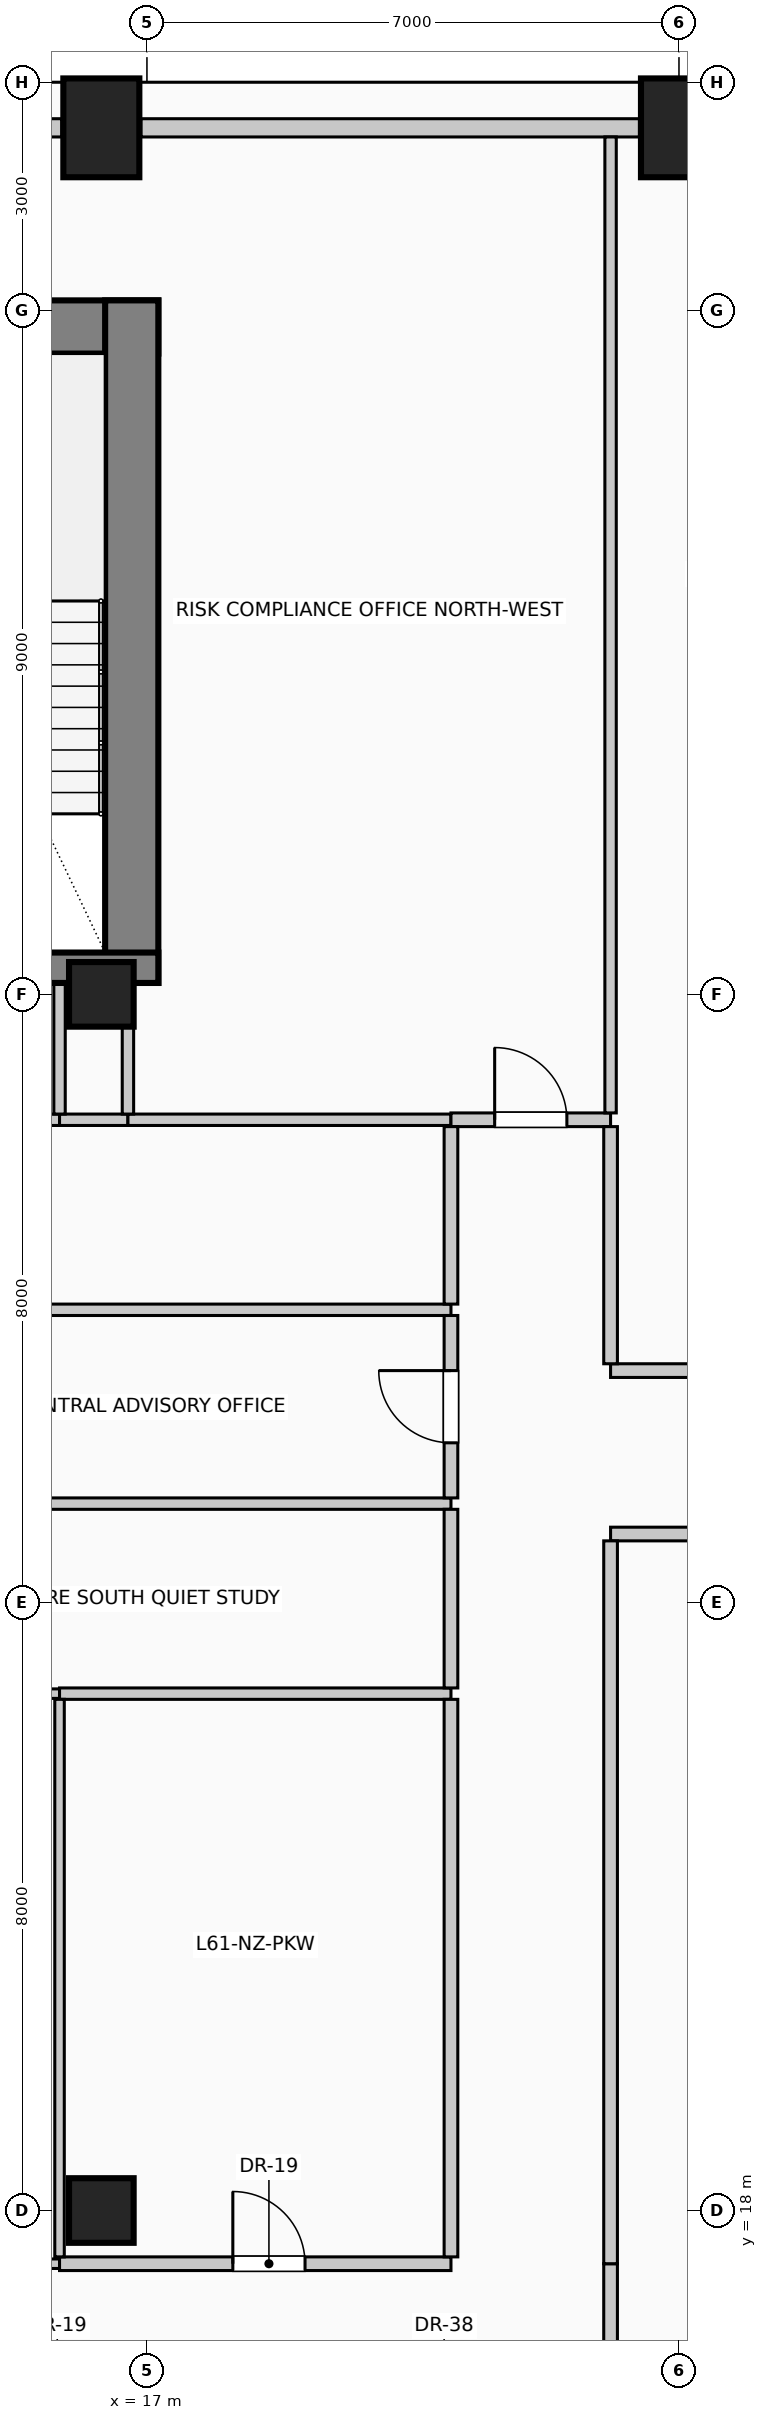
"""IFC4 building model, lengths in metres.
Left out: names, types, materials, properties, quantities, classifications, styles, units other than length and angle.
Written with IfcOpenShell. Run it as: python <this file> out.ifc"""

import sys

from ifc_helpers import new_model, si_unit, direction, frame, frame_2d, origin, origin_2d, place, context, subcontext, project, spatial, rectangle, circle, extrude, element, fill, save


model = new_model("IFC4")
c1 = context("Model", 3, precision=1e-05, world=origin(), true_north=direction((0.0, 1.0)))
c2 = subcontext(c1, "Body", "Model", "MODEL_VIEW")
j1 = project(units=[si_unit("LENGTHUNIT", "METRE"), si_unit("PLANEANGLEUNIT", "RADIAN")], contexts=[c1])
p1 = place(None, origin())
s1 = spatial("IfcSite", under=j1, at=p1, CompositionType="ELEMENT")
p2 = place(p1, origin())
s2 = spatial("IfcBuilding", under=s1, at=p2, CompositionType="ELEMENT")
p3 = place(p2, frame((0.0, 0.0, 252.6)))
s3 = spatial("IfcBuildingStorey", under=s2, at=p3, CompositionType="ELEMENT", Elevation=252.6)
p4 = place(p3, frame((2.85, 42.78, 0.0), z_axis=(0.0, 0.0, 1.0), x_axis=(1.0, 0.0, 0.0)))
e1 = element("IfcWall", 1, at=p4, inside=s3, PredefinedType="SHEAR", context=c2, shape_type="SweptSolid", body=[
    extrude(rectangle(XDim=14.3, YDim=0.7, at=frame_2d((7.15, 0.0))), origin(), (0.0, 0.0, 1.0), 4.0),
])
p5 = place(p3, frame((16.8, 34.15, 0.0), z_axis=(0.0, 0.0, 1.0), x_axis=(0.0, 1.0, 0.0)))
e2 = element("IfcWall", 2, at=p5, inside=s3, PredefinedType="SHEAR", context=c2, shape_type="SweptSolid", body=[
    extrude(rectangle(XDim=8.98, YDim=0.7, at=frame_2d((4.49, 0.0))), origin(), (0.0, 0.0, 1.0), 4.0),
])
p6 = place(p3, frame((12.29, 34.35, 0.0), z_axis=(0.0, 0.0, 1.0), x_axis=(1.0, 0.0, 0.0)))
e3 = element("IfcWall", 3, at=p6, inside=s3, PredefinedType="SHEAR", context=c2, shape_type="SweptSolid", body=[
    extrude(rectangle(XDim=4.86, YDim=0.4, at=frame_2d((2.43, 0.0))), origin(), (0.0, 0.0, 1.0), 4.0),
])
p7 = place(p6, frame((1.4, 0.0, 0.0)))
e4 = element("IfcOpeningElement", 4, at=p7, cuts=e3, PredefinedType="OPENING", context=c2, shape_type="SweptSolid", body=[
    extrude(rectangle(XDim=1.15, YDim=2.2, at=frame_2d((0.575, 1.1))), frame((0.0, 0.21, 0.0), z_axis=(0.0, -1.0, 0.0), x_axis=(1.0, 0.0, 0.0)), (0.0, 0.0, 1.0), 0.42),
])
for number, where, z_axis, x_axis in (
    (5, (16.4, 45.4, 0.0), (0.0, 0.0, 1.0), (1.0, 0.0, 0.0)),
    (6, (24.0, 45.4, 0.0), (0.0, 0.0, 1.0), (1.0, 0.0, 0.0)),
):
    element("IfcColumn", number, at=place(p3, frame(where, z_axis=z_axis, x_axis=x_axis)), inside=s3, PredefinedType="COLUMN", context=c2, shape_type="SweptSolid", body=[
        extrude(rectangle(XDim=1.0, YDim=1.3, at=origin_2d()), origin(), (0.0, 0.0, 1.0), 4.0),
    ])
for number, where, z_axis, x_axis in (
    (7, (16.4, 18.0, 0.0), (0.0, 0.0, 1.0), (1.0, 0.0, 0.0)),
    (8, (16.4, 34.0, 0.0), (0.0, 0.0, 1.0), (1.0, 0.0, 0.0)),
):
    element("IfcColumn", number, at=place(p3, frame(where, z_axis=z_axis, x_axis=x_axis)), inside=s3, PredefinedType="COLUMN", context=c2, shape_type="SweptSolid", body=[
        extrude(circle(Radius=0.425, at=origin_2d()), origin(), (0.0, 0.0, 1.0), 4.0),
    ])
p8 = place(p3, frame((14.395, 45.4, 0.0), z_axis=(0.0, 0.0, 1.0), x_axis=(1.0, 0.0, 0.0)))
e9 = element("IfcWall", 9, at=p8, inside=s3, PredefinedType="SOLIDWALL", context=c2, shape_type="SweptSolid", body=[
    extrude(rectangle(XDim=1.485, YDim=0.24, at=frame_2d((0.742, 0.0))), origin(), (0.0, 0.0, 1.0), 3.0),
])
p9 = place(p3, frame((16.92, 45.4, 0.0), z_axis=(0.0, 0.0, 1.0), x_axis=(1.0, 0.0, 0.0)))
e10 = element("IfcWall", 10, at=p9, inside=s3, PredefinedType="SOLIDWALL", context=c2, shape_type="SweptSolid", body=[
    extrude(rectangle(XDim=6.56, YDim=0.24, at=frame_2d((3.28, 0.0))), origin(), (0.0, 0.0, 1.0), 3.0),
])
p10 = place(p3, frame((9.8, 17.3, 0.0), z_axis=(0.0, 0.0, 1.0), x_axis=(1.0, 0.0, 0.0)))
e11 = element("IfcWall", 11, at=p10, inside=s3, PredefinedType="PARTITIONING", context=c2, shape_type="SweptSolid", body=[
    extrude(rectangle(XDim=6.05, YDim=0.125, at=frame_2d((3.025, 0.0))), origin(), (0.0, 0.0, 1.0), 3.75),
])
p11 = place(p10, frame((2.575, 0.0, 0.0)))
e12 = element("IfcOpeningElement", 12, at=p11, cuts=e11, PredefinedType="OPENING", context=c2, shape_type="SweptSolid", body=[
    extrude(rectangle(XDim=0.9, YDim=2.1, at=frame_2d((0.45, 1.05))), frame((0.0, 0.073, 0.0), z_axis=(0.0, -1.0, 0.0), x_axis=(1.0, 0.0, 0.0)), (0.0, 0.0, 1.0), 0.145),
])
p12 = place(p3, frame((15.85, 17.3, 0.0), z_axis=(0.0, 0.0, 1.0), x_axis=(1.0, 0.0, 0.0)))
e13 = element("IfcWall", 13, at=p12, inside=s3, PredefinedType="PARTITIONING", context=c2, shape_type="SweptSolid", body=[
    extrude(rectangle(XDim=5.15, YDim=0.18, at=frame_2d((2.575, 0.0))), origin(), (0.0, 0.0, 1.0), 3.75),
])
p13 = place(p12, frame((2.28, 0.0, 0.0)))
e14 = element("IfcOpeningElement", 14, at=p13, cuts=e13, PredefinedType="OPENING", context=c2, shape_type="SweptSolid", body=[
    extrude(rectangle(XDim=0.95, YDim=2.15, at=frame_2d((0.475, 1.075))), frame((0.0, 0.1, 0.0), z_axis=(0.0, -1.0, 0.0), x_axis=(1.0, 0.0, 0.0)), (0.0, 0.0, 1.0), 0.2),
])
p14 = place(p3, frame((12.2, 24.8, 0.0), z_axis=(0.0, 0.0, 1.0), x_axis=(1.0, 0.0, 0.0)))
e15 = element("IfcWall", 15, at=p14, inside=s3, PredefinedType="PARTITIONING", context=c2, shape_type="SweptSolid", body=[
    extrude(rectangle(XDim=3.65, YDim=0.125, at=frame_2d((1.825, 0.0))), origin(), (0.0, 0.0, 1.0), 3.75),
])
p15 = place(p3, frame((15.85, 24.8, 0.0), z_axis=(0.0, 0.0, 1.0), x_axis=(1.0, 0.0, 0.0)))
e16 = element("IfcWall", 16, at=p15, inside=s3, PredefinedType="PARTITIONING", context=c2, shape_type="SweptSolid", body=[
    extrude(rectangle(XDim=5.15, YDim=0.15, at=frame_2d((2.575, 0.0))), origin(), (0.0, 0.0, 1.0), 3.75),
])
p16 = place(p3, frame((23.1, 26.9, 0.0), z_axis=(0.0, 0.0, 1.0), x_axis=(1.0, 0.0, 0.0)))
e17 = element("IfcWall", 17, at=p16, inside=s3, PredefinedType="PARTITIONING", context=c2, shape_type="SweptSolid", body=[
    extrude(rectangle(XDim=9.02, YDim=0.18, at=frame_2d((4.51, 0.0))), origin(), (0.0, 0.0, 1.0), 3.75),
])
p17 = place(p16, frame((4.035, 0.0, 0.0)))
e18 = element("IfcOpeningElement", 18, at=p17, cuts=e17, PredefinedType="OPENING", context=c2, shape_type="SweptSolid", body=[
    extrude(rectangle(XDim=0.95, YDim=2.15, at=frame_2d((0.475, 1.075))), frame((0.0, 0.1, 0.0), z_axis=(0.0, -1.0, 0.0), x_axis=(1.0, 0.0, 0.0)), (0.0, 0.0, 1.0), 0.2),
])
p18 = place(p3, frame((12.2, 27.3, 0.0), z_axis=(0.0, 0.0, 1.0), x_axis=(1.0, 0.0, 0.0)))
e19 = element("IfcWall", 19, at=p18, inside=s3, PredefinedType="PARTITIONING", context=c2, shape_type="SweptSolid", body=[
    extrude(rectangle(XDim=8.8, YDim=0.15, at=frame_2d((4.4, 0.0))), origin(), (0.0, 0.0, 1.0), 3.75),
])
p19 = place(p3, frame((23.1, 29.05, 0.0), z_axis=(0.0, 0.0, 1.0), x_axis=(1.0, 0.0, 0.0)))
e20 = element("IfcWall", 20, at=p19, inside=s3, PredefinedType="PARTITIONING", context=c2, shape_type="SweptSolid", body=[
    extrude(rectangle(XDim=7.33, YDim=0.18, at=frame_2d((3.665, 0.0))), origin(), (0.0, 0.0, 1.0), 3.75),
])
p20 = place(p19, frame((3.14, 0.0, 0.0)))
e21 = element("IfcOpeningElement", 21, at=p20, cuts=e20, PredefinedType="OPENING", context=c2, shape_type="SweptSolid", body=[
    extrude(rectangle(XDim=1.05, YDim=2.15, at=frame_2d((0.525, 1.075))), frame((0.0, 0.1, 0.0), z_axis=(0.0, -1.0, 0.0), x_axis=(1.0, 0.0, 0.0)), (0.0, 0.0, 1.0), 0.2),
])
p21 = place(p3, frame((12.33, 29.85, 0.0), z_axis=(0.0, 0.0, 1.0), x_axis=(1.0, 0.0, 0.0)))
e22 = element("IfcWall", 22, at=p21, inside=s3, PredefinedType="PARTITIONING", context=c2, shape_type="SweptSolid", body=[
    extrude(rectangle(XDim=8.67, YDim=0.15, at=frame_2d((4.335, 0.0))), origin(), (0.0, 0.0, 1.0), 3.75),
])
p22 = place(p3, frame((12.33, 32.35, 0.0), z_axis=(0.0, 0.0, 1.0), x_axis=(1.0, 0.0, 0.0)))
e23 = element("IfcWall", 23, at=p22, inside=s3, PredefinedType="PARTITIONING", context=c2, shape_type="SweptSolid", body=[
    extrude(rectangle(XDim=3.52, YDim=0.15, at=frame_2d((1.76, 0.0))), origin(), (0.0, 0.0, 1.0), 3.75),
])
p23 = place(p22, frame((1.235, 0.0, 0.0)))
e24 = element("IfcOpeningElement", 24, at=p23, cuts=e23, PredefinedType="OPENING", context=c2, shape_type="SweptSolid", body=[
    extrude(rectangle(XDim=1.05, YDim=2.15, at=frame_2d((0.525, 1.075))), frame((0.0, 0.085, 0.0), z_axis=(0.0, -1.0, 0.0), x_axis=(1.0, 0.0, 0.0)), (0.0, 0.0, 1.0), 0.17),
])
p24 = place(p3, frame((15.85, 32.35, 0.0), z_axis=(0.0, 0.0, 1.0), x_axis=(1.0, 0.0, 0.0)))
e25 = element("IfcWall", 25, at=p24, inside=s3, PredefinedType="PARTITIONING", context=c2, shape_type="SweptSolid", body=[
    extrude(rectangle(XDim=0.9, YDim=0.15, at=frame_2d((0.45, 0.0))), origin(), (0.0, 0.0, 1.0), 3.75),
])
p25 = place(p3, frame((16.75, 32.35, 0.0), z_axis=(0.0, 0.0, 1.0), x_axis=(1.0, 0.0, 0.0)))
e26 = element("IfcWall", 26, at=p25, inside=s3, PredefinedType="PARTITIONING", context=c2, shape_type="SweptSolid", body=[
    extrude(rectangle(XDim=4.25, YDim=0.15, at=frame_2d((2.125, 0.0))), origin(), (0.0, 0.0, 1.0), 3.75),
])
p26 = place(p3, frame((21.0, 32.35, 0.0), z_axis=(0.0, 0.0, 1.0), x_axis=(1.0, 0.0, 0.0)))
e27 = element("IfcWall", 27, at=p26, inside=s3, PredefinedType="PARTITIONING", context=c2, shape_type="SweptSolid", body=[
    extrude(rectangle(XDim=2.1, YDim=0.18, at=frame_2d((1.05, 0.0))), origin(), (0.0, 0.0, 1.0), 3.75),
])
p27 = place(p26, frame((0.575, 0.0, 0.0)))
e28 = element("IfcOpeningElement", 28, at=p27, cuts=e27, PredefinedType="OPENING", context=c2, shape_type="SweptSolid", body=[
    extrude(rectangle(XDim=0.95, YDim=2.15, at=frame_2d((0.475, 1.075))), frame((0.0, 0.1, 0.0), z_axis=(0.0, -1.0, 0.0), x_axis=(1.0, 0.0, 0.0)), (0.0, 0.0, 1.0), 0.2),
])
p28 = place(p3, frame((15.85, 17.39, 0.0), z_axis=(0.0, 0.0, 1.0), x_axis=(0.0, 1.0, 0.0)))
e29 = element("IfcWall", 29, at=p28, inside=s3, PredefinedType="PARTITIONING", context=c2, shape_type="SweptSolid", body=[
    extrude(rectangle(XDim=7.335, YDim=0.125, at=frame_2d((3.667, 0.0))), origin(), (0.0, 0.0, 1.0), 3.75),
])
p29 = place(p3, frame((15.85, 32.425, 0.0), z_axis=(0.0, 0.0, 1.0), x_axis=(0.0, 1.0, 0.0)))
e30 = element("IfcWall", 30, at=p29, inside=s3, PredefinedType="PARTITIONING", context=c2, shape_type="SweptSolid", body=[
    extrude(rectangle(XDim=1.725, YDim=0.15, at=frame_2d((0.862, 0.0))), origin(), (0.0, 0.0, 1.0), 3.75),
])
p30 = place(p3, frame((16.75, 32.425, 0.0), z_axis=(0.0, 0.0, 1.0), x_axis=(0.0, 1.0, 0.0)))
e31 = element("IfcWall", 31, at=p30, inside=s3, PredefinedType="PARTITIONING", context=c2, shape_type="SweptSolid", body=[
    extrude(rectangle(XDim=1.15, YDim=0.15, at=frame_2d((0.575, 0.0))), origin(), (0.0, 0.0, 1.0), 3.75),
])
p31 = place(p3, frame((21.0, 17.39, 0.0), z_axis=(0.0, 0.0, 1.0), x_axis=(0.0, 1.0, 0.0)))
e32 = element("IfcWall", 32, at=p31, inside=s3, PredefinedType="PARTITIONING", context=c2, shape_type="SweptSolid", body=[
    extrude(rectangle(XDim=7.335, YDim=0.18, at=frame_2d((3.667, 0.0))), origin(), (0.0, 0.0, 1.0), 3.75),
])
p32 = place(p3, frame((21.0, 24.875, 0.0), z_axis=(0.0, 0.0, 1.0), x_axis=(0.0, 1.0, 0.0)))
e33 = element("IfcWall", 33, at=p32, inside=s3, PredefinedType="PARTITIONING", context=c2, shape_type="SweptSolid", body=[
    extrude(rectangle(XDim=2.35, YDim=0.18, at=frame_2d((1.175, 0.0))), origin(), (0.0, 0.0, 1.0), 3.75),
])
p33 = place(p3, frame((21.0, 27.375, 0.0), z_axis=(0.0, 0.0, 1.0), x_axis=(0.0, 1.0, 0.0)))
e34 = element("IfcWall", 34, at=p33, inside=s3, PredefinedType="PARTITIONING", context=c2, shape_type="SweptSolid", body=[
    extrude(rectangle(XDim=2.4, YDim=0.18, at=frame_2d((1.2, 0.0))), origin(), (0.0, 0.0, 1.0), 3.75),
])
p34 = place(p33, frame((0.725, 0.0, 0.0)))
e35 = element("IfcOpeningElement", 35, at=p34, cuts=e34, PredefinedType="OPENING", context=c2, shape_type="SweptSolid", body=[
    extrude(rectangle(XDim=0.95, YDim=2.15, at=frame_2d((0.475, 1.075))), frame((0.0, 0.1, 0.0), z_axis=(0.0, -1.0, 0.0), x_axis=(1.0, 0.0, 0.0)), (0.0, 0.0, 1.0), 0.2),
])
p35 = place(p3, frame((21.0, 29.925, 0.0), z_axis=(0.0, 0.0, 1.0), x_axis=(0.0, 1.0, 0.0)))
e36 = element("IfcWall", 36, at=p35, inside=s3, PredefinedType="PARTITIONING", context=c2, shape_type="SweptSolid", body=[
    extrude(rectangle(XDim=2.335, YDim=0.18, at=frame_2d((1.167, 0.0))), origin(), (0.0, 0.0, 1.0), 3.75),
])
p36 = place(p3, frame((23.1, 15.29, 0.0), z_axis=(0.0, 0.0, 1.0), x_axis=(0.0, 1.0, 0.0)))
e37 = element("IfcWall", 37, at=p36, inside=s3, PredefinedType="PARTITIONING", context=c2, shape_type="SweptSolid", body=[
    extrude(rectangle(XDim=2.01, YDim=0.18, at=frame_2d((1.005, 0.0))), origin(), (0.0, 0.0, 1.0), 3.75),
])
p37 = place(p3, frame((23.1, 17.3, 0.0), z_axis=(0.0, 0.0, 1.0), x_axis=(0.0, 1.0, 0.0)))
e38 = element("IfcWall", 38, at=p37, inside=s3, PredefinedType="PARTITIONING", context=c2, shape_type="SweptSolid", body=[
    extrude(rectangle(XDim=9.51, YDim=0.18, at=frame_2d((4.755, 0.0))), origin(), (0.0, 0.0, 1.0), 3.75),
])
p38 = place(p3, frame((23.1, 29.14, 0.0), z_axis=(0.0, 0.0, 1.0), x_axis=(0.0, 1.0, 0.0)))
e39 = element("IfcWall", 39, at=p38, inside=s3, PredefinedType="PARTITIONING", context=c2, shape_type="SweptSolid", body=[
    extrude(rectangle(XDim=3.12, YDim=0.18, at=frame_2d((1.56, 0.0))), origin(), (0.0, 0.0, 1.0), 3.75),
])
p39 = place(p3, frame((23.1, 32.44, 0.0), z_axis=(0.0, 0.0, 1.0), x_axis=(0.0, 1.0, 0.0)))
e40 = element("IfcWall", 40, at=p39, inside=s3, PredefinedType="PARTITIONING", context=c2, shape_type="SweptSolid", body=[
    extrude(rectangle(XDim=12.84, YDim=0.15, at=frame_2d((6.42, 0.0))), origin(), (0.0, 0.0, 1.0), 3.75),
])
p40 = place(p13, origin())
e41 = element("IfcDoor", 41, at=p40, inside=s3, OperationType="SINGLE_SWING_LEFT", PredefinedType="DOOR", context=c2, shape_type="SweptSolid", body=[
    extrude(rectangle(XDim=0.95, YDim=2.15, at=frame_2d((0.475, 1.075))), frame((0.0, 0.025, 0.0), z_axis=(0.0, -1.0, 0.0), x_axis=(1.0, 0.0, 0.0)), (0.0, 0.0, 1.0), 0.05),
])
fill(e14, e41)
p41 = place(p27, origin())
e42 = element("IfcDoor", 42, at=p41, inside=s3, OperationType="SINGLE_SWING_LEFT", PredefinedType="DOOR", context=c2, shape_type="SweptSolid", body=[
    extrude(rectangle(XDim=0.95, YDim=2.15, at=frame_2d((0.475, 1.075))), frame((0.0, 0.025, 0.0), z_axis=(0.0, -1.0, 0.0), x_axis=(1.0, 0.0, 0.0)), (0.0, 0.0, 1.0), 0.05),
])
fill(e28, e42)
p42 = place(p34, origin())
e43 = element("IfcDoor", 43, at=p42, inside=s3, OperationType="SINGLE_SWING_RIGHT", PredefinedType="DOOR", context=c2, shape_type="SweptSolid", body=[
    extrude(rectangle(XDim=0.95, YDim=2.15, at=frame_2d((0.475, 1.075))), frame((0.0, 0.025, 0.0), z_axis=(0.0, -1.0, 0.0), x_axis=(1.0, 0.0, 0.0)), (0.0, 0.0, 1.0), 0.05),
])
fill(e35, e43)
save(model, sys.argv[1])
